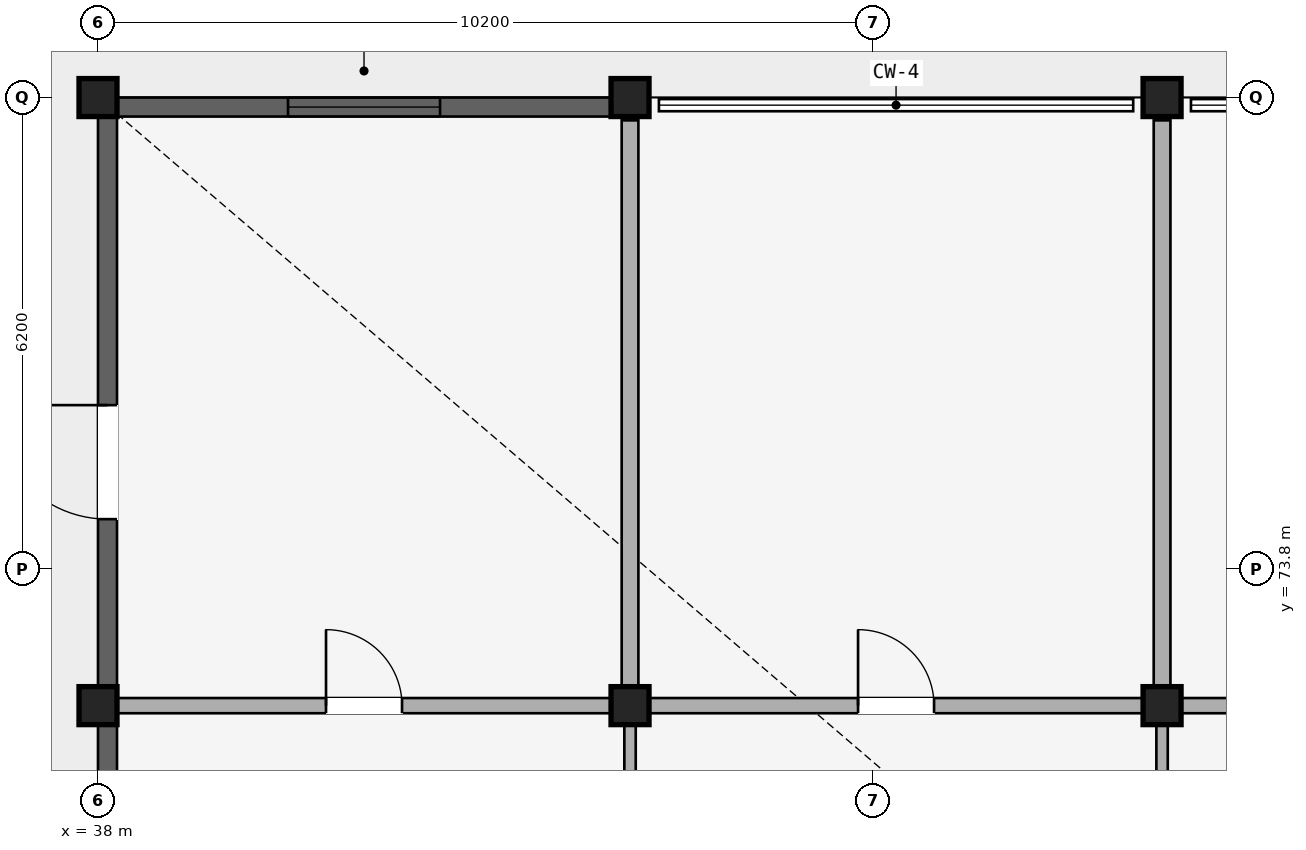
"""IFC4 building model, lengths in metres.
Left out: names, types, materials, properties, quantities, classifications, styles, units other than length and angle.
Written with IfcOpenShell. Run it as: python <this file> out.ifc"""

import sys

from ifc_helpers import new_model, si_unit, direction, frame, frame_2d, origin, origin_2d, place, context, subcontext, project, spatial, rectangle, extrude, element, fill, save


model = new_model("IFC4")
c1 = context("Model", 3, precision=1e-05, world=origin(), true_north=direction((0.0, 1.0)))
c2 = subcontext(c1, "Body", "Model", "MODEL_VIEW")
j1 = project(units=[si_unit("LENGTHUNIT", "METRE"), si_unit("PLANEANGLEUNIT", "RADIAN")], contexts=[c1])
p1 = place(None, origin())
s1 = spatial("IfcSite", under=j1, at=p1, CompositionType="ELEMENT")
p2 = place(p1, origin())
s2 = spatial("IfcBuilding", under=s1, at=p2, CompositionType="ELEMENT")
p3 = place(p2, origin())
s3 = spatial("IfcBuildingStorey", under=s2, at=p3, CompositionType="ELEMENT", Elevation=0.0)
for number, where, z_axis, x_axis in (
    (1, (38.0, 72.0, 0.0), (0.0, 0.0, 1.0), (1.0, 0.0, 0.0)),
    (2, (38.0, 80.0, 0.0), (0.0, 0.0, 1.0), (1.0, 0.0, 0.0)),
    (3, (45.0, 72.0, 0.0), (0.0, 0.0, 1.0), (1.0, 0.0, 0.0)),
    (4, (45.0, 80.0, 0.0), (0.0, 0.0, 1.0), (1.0, 0.0, 0.0)),
    (5, (52.0, 72.0, 0.0), (0.0, 0.0, 1.0), (1.0, 0.0, 0.0)),
    (6, (52.0, 80.0, 0.0), (0.0, 0.0, 1.0), (1.0, 0.0, 0.0)),
):
    element("IfcColumn", number, at=place(p3, frame(where, z_axis=z_axis, x_axis=x_axis)), inside=s3, PredefinedType="COLUMN", context=c2, shape_type="SweptSolid", body=[
        extrude(rectangle(XDim=0.5, YDim=0.5, at=origin_2d()), origin(), (0.0, 0.0, 1.0), 4.28),
    ])
p4 = place(p3, frame((38.15, 72.0, 0.0), z_axis=(0.0, 0.0, 1.0), x_axis=(1.0, 0.0, 0.0)))
e7 = element("IfcWall", 7, at=p4, inside=s3, PredefinedType="STANDARD", context=c2, shape_type="SweptSolid", body=[
    extrude(rectangle(XDim=6.7, YDim=0.2, at=frame_2d((3.35, 0.0))), origin(), (0.0, 0.0, 1.0), 3.672),
])
p5 = place(p4, frame((2.85, 0.0, 0.0)))
e8 = element("IfcOpeningElement", 8, at=p5, cuts=e7, PredefinedType="OPENING", context=c2, shape_type="SweptSolid", body=[
    extrude(rectangle(XDim=1.0, YDim=2.15, at=frame_2d((0.5, 1.075))), frame((0.0, 0.11, 0.0), z_axis=(0.0, -1.0, 0.0), x_axis=(1.0, 0.0, 0.0)), (0.0, 0.0, 1.0), 0.22),
])
p6 = place(p3, frame((45.15, 72.0, 0.0), z_axis=(0.0, 0.0, 1.0), x_axis=(1.0, 0.0, 0.0)))
e9 = element("IfcWall", 9, at=p6, inside=s3, PredefinedType="STANDARD", context=c2, shape_type="SweptSolid", body=[
    extrude(rectangle(XDim=6.7, YDim=0.2, at=frame_2d((3.35, 0.0))), origin(), (0.0, 0.0, 1.0), 3.672),
])
p7 = place(p6, frame((2.85, 0.0, 0.0)))
e10 = element("IfcOpeningElement", 10, at=p7, cuts=e9, PredefinedType="OPENING", context=c2, shape_type="SweptSolid", body=[
    extrude(rectangle(XDim=1.0, YDim=2.15, at=frame_2d((0.5, 1.075))), frame((0.0, 0.11, 0.0), z_axis=(0.0, -1.0, 0.0), x_axis=(1.0, 0.0, 0.0)), (0.0, 0.0, 1.0), 0.22),
])
p8 = place(p3, frame((52.15, 72.0, 0.0), z_axis=(0.0, 0.0, 1.0), x_axis=(1.0, 0.0, 0.0)))
e11 = element("IfcWall", 11, at=p8, inside=s3, PredefinedType="STANDARD", context=c2, shape_type="SweptSolid", body=[
    extrude(rectangle(XDim=6.7, YDim=0.2, at=frame_2d((3.35, 0.0))), origin(), (0.0, 0.0, 1.0), 3.672),
])
p9 = place(p8, frame((2.85, 0.0, 0.0)))
e12 = element("IfcOpeningElement", 12, at=p9, cuts=e11, PredefinedType="OPENING", context=c2, shape_type="SweptSolid", body=[
    extrude(rectangle(XDim=1.0, YDim=2.15, at=frame_2d((0.5, 1.075))), frame((0.0, 0.11, 0.0), z_axis=(0.0, -1.0, 0.0), x_axis=(1.0, 0.0, 0.0)), (0.0, 0.0, 1.0), 0.22),
])
p10 = place(p3, frame((45.0, 64.1, 0.0), z_axis=(0.0, 0.0, 1.0), x_axis=(0.0, 1.0, 0.0)))
e13 = element("IfcWall", 13, at=p10, inside=s3, PredefinedType="PARTITIONING", context=c2, shape_type="SweptSolid", body=[
    extrude(rectangle(XDim=7.8, YDim=0.15, at=frame_2d((3.9, 0.0))), origin(), (0.0, 0.0, 1.0), 3.672),
])
p11 = place(p10, frame((3.0, 0.0, 0.0)))
e14 = element("IfcOpeningElement", 14, at=p11, cuts=e13, PredefinedType="OPENING", context=c2, shape_type="SweptSolid", body=[
    extrude(rectangle(XDim=1.8, YDim=2.2, at=frame_2d((0.9, 1.1))), frame((0.0, 0.085, 0.0), z_axis=(0.0, -1.0, 0.0), x_axis=(1.0, 0.0, 0.0)), (0.0, 0.0, 1.0), 0.17),
])
p12 = place(p3, frame((45.0, 72.1, 0.0), z_axis=(0.0, 0.0, 1.0), x_axis=(0.0, 1.0, 0.0)))
e15 = element("IfcWall", 15, at=p12, inside=s3, PredefinedType="STANDARD", context=c2, shape_type="SweptSolid", body=[
    extrude(rectangle(XDim=7.6, YDim=0.22, at=frame_2d((3.8, 0.0))), origin(), (0.0, 0.0, 1.0), 3.672),
])
p13 = place(p3, frame((52.0, 64.1, 0.0), z_axis=(0.0, 0.0, 1.0), x_axis=(0.0, 1.0, 0.0)))
e16 = element("IfcWall", 16, at=p13, inside=s3, PredefinedType="PARTITIONING", context=c2, shape_type="SweptSolid", body=[
    extrude(rectangle(XDim=7.8, YDim=0.15, at=frame_2d((3.9, 0.0))), origin(), (0.0, 0.0, 1.0), 3.672),
])
p14 = place(p13, frame((3.0, 0.0, 0.0)))
e17 = element("IfcOpeningElement", 17, at=p14, cuts=e16, PredefinedType="OPENING", context=c2, shape_type="SweptSolid", body=[
    extrude(rectangle(XDim=1.8, YDim=2.2, at=frame_2d((0.9, 1.1))), frame((0.0, 0.085, 0.0), z_axis=(0.0, -1.0, 0.0), x_axis=(1.0, 0.0, 0.0)), (0.0, 0.0, 1.0), 0.17),
])
p15 = place(p3, frame((52.0, 72.1, 0.0), z_axis=(0.0, 0.0, 1.0), x_axis=(0.0, 1.0, 0.0)))
e18 = element("IfcWall", 18, at=p15, inside=s3, PredefinedType="STANDARD", context=c2, shape_type="SweptSolid", body=[
    extrude(rectangle(XDim=7.6, YDim=0.22, at=frame_2d((3.8, 0.0))), origin(), (0.0, 0.0, 1.0), 3.672),
])
p16 = place(p3, frame((38.253, 79.875, 0.0), z_axis=(0.0, 0.0, 1.0), x_axis=(1.0, 0.0, 0.0)))
e19 = element("IfcWall", 19, at=p16, inside=s3, PredefinedType="STANDARD", context=c2, shape_type="SweptSolid", body=[
    extrude(rectangle(XDim=6.493, YDim=0.25, at=frame_2d((3.247, 0.0))), origin(), (0.0, 0.0, 1.0), 3.672),
])
p17 = place(p16, frame((2.247, 0.0, 0.88)))
e20 = element("IfcOpeningElement", 20, at=p17, cuts=e19, PredefinedType="OPENING", context=c2, shape_type="SweptSolid", body=[
    extrude(rectangle(XDim=2.0, YDim=1.95, at=frame_2d((1.0, 0.975))), frame((0.0, 0.135, 0.0), z_axis=(0.0, -1.0, 0.0), x_axis=(1.0, 0.0, 0.0)), (0.0, 0.0, 1.0), 0.27),
])
p18 = place(p3, frame((38.125, 64.253, 0.0), z_axis=(0.0, 0.0, 1.0), x_axis=(0.0, 1.0, 0.0)))
e21 = element("IfcWall", 21, at=p18, inside=s3, PredefinedType="STANDARD", context=c2, shape_type="SweptSolid", body=[
    extrude(rectangle(XDim=7.493, YDim=0.25, at=frame_2d((3.747, 0.0))), origin(), (0.0, 0.0, 1.0), 3.672),
])
p19 = place(p18, frame((2.747, 0.0, 0.88)))
e22 = element("IfcOpeningElement", 22, at=p19, cuts=e21, PredefinedType="OPENING", context=c2, shape_type="SweptSolid", body=[
    extrude(rectangle(XDim=2.0, YDim=1.95, at=frame_2d((1.0, 0.975))), frame((0.0, 0.135, 0.0), z_axis=(0.0, -1.0, 0.0), x_axis=(1.0, 0.0, 0.0)), (0.0, 0.0, 1.0), 0.27),
])
p20 = place(p3, frame((38.125, 72.253, 0.0), z_axis=(0.0, 0.0, 1.0), x_axis=(0.0, 1.0, 0.0)))
e23 = element("IfcWall", 23, at=p20, inside=s3, PredefinedType="STANDARD", context=c2, shape_type="SweptSolid", body=[
    extrude(rectangle(XDim=7.493, YDim=0.25, at=frame_2d((3.747, 0.0))), origin(), (0.0, 0.0, 1.0), 3.672),
])
p21 = place(p20, frame((2.2, 0.0, 0.0)))
e24 = element("IfcOpeningElement", 24, at=p21, cuts=e23, PredefinedType="OPENING", context=c2, shape_type="SweptSolid", body=[
    extrude(rectangle(XDim=1.5, YDim=2.15, at=frame_2d((0.75, 1.075))), frame((0.0, 0.135, 0.0), z_axis=(0.0, -1.0, 0.0), x_axis=(1.0, 0.0, 0.0)), (0.0, 0.0, 1.0), 0.27),
])
p22 = place(p17, origin())
e25 = element("IfcWindow", 25, at=p22, inside=s3, PartitioningType="TRIPLE_PANEL_VERTICAL", PredefinedType="WINDOW", context=c2, shape_type="SweptSolid", body=[
    extrude(rectangle(XDim=2.0, YDim=1.95, at=frame_2d((1.0, 0.975))), frame((0.0, 0.03, 0.0), z_axis=(0.0, -1.0, 0.0), x_axis=(1.0, 0.0, 0.0)), (0.0, 0.0, 1.0), 0.06),
])
fill(e20, e25)
p23 = place(p5, origin())
e26 = element("IfcDoor", 26, at=p23, inside=s3, OperationType="SINGLE_SWING_LEFT", PredefinedType="DOOR", context=c2, shape_type="SweptSolid", body=[
    extrude(rectangle(XDim=1.0, YDim=2.15, at=frame_2d((0.5, 1.075))), frame((0.0, 0.025, 0.0), z_axis=(0.0, -1.0, 0.0), x_axis=(1.0, 0.0, 0.0)), (0.0, 0.0, 1.0), 0.05),
])
fill(e8, e26)
p24 = place(p7, frame((1.0, 0.0, 0.0), z_axis=(0.0, 0.0, 1.0), x_axis=(-1.0, 0.0, 0.0)))
e27 = element("IfcDoor", 27, at=p24, inside=s3, OperationType="SINGLE_SWING_RIGHT", PredefinedType="DOOR", context=c2, shape_type="SweptSolid", body=[
    extrude(rectangle(XDim=1.0, YDim=2.15, at=frame_2d((0.5, 1.075))), frame((0.0, 0.025, 0.0), z_axis=(0.0, -1.0, 0.0), x_axis=(1.0, 0.0, 0.0)), (0.0, 0.0, 1.0), 0.05),
])
fill(e10, e27)
p25 = place(p21, origin())
e28 = element("IfcDoor", 28, at=p25, inside=s3, OperationType="SINGLE_SWING_RIGHT", PredefinedType="DOOR", context=c2, shape_type="SweptSolid", body=[
    extrude(rectangle(XDim=1.5, YDim=2.15, at=frame_2d((0.75, 1.075))), frame((0.0, 0.025, 0.0), z_axis=(0.0, -1.0, 0.0), x_axis=(1.0, 0.0, 0.0)), (0.0, 0.0, 1.0), 0.05),
])
fill(e24, e28)
save(model, sys.argv[1])
